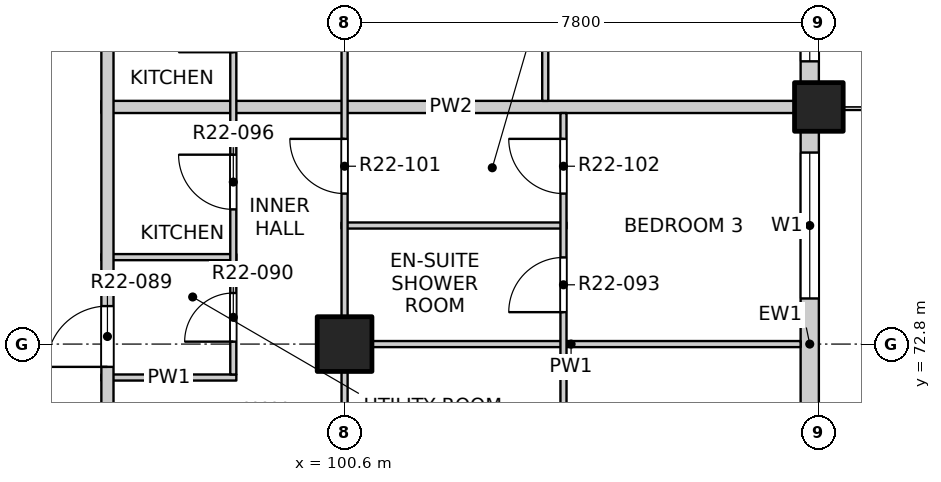
"""IFC4 building model, lengths in metres.
Left out: names, types, materials, properties, quantities, classifications, styles, units other than length and angle.
Written with IfcOpenShell. Run it as: python <this file> out.ifc"""

import sys

from ifc_helpers import new_model, si_unit, direction, frame, frame_2d, origin, origin_2d, place, context, subcontext, project, spatial, rectangle, extrude, element, fill, save


model = new_model("IFC4")
c1 = context("Model", 3, precision=1e-05, world=origin(), true_north=direction((0.0, 1.0)))
c2 = subcontext(c1, "Body", "Model", "MODEL_VIEW")
j1 = project(units=[si_unit("LENGTHUNIT", "METRE"), si_unit("PLANEANGLEUNIT", "RADIAN")], contexts=[c1])
p1 = place(None, origin())
s1 = spatial("IfcSite", under=j1, at=p1, CompositionType="ELEMENT")
p2 = place(p1, origin())
s2 = spatial("IfcBuilding", under=s1, at=p2, CompositionType="ELEMENT")
p3 = place(p2, frame((0.0, 0.0, 231.3)))
s3 = spatial("IfcBuildingStorey", under=s2, at=p3, CompositionType="ELEMENT", Elevation=231.3)
p4 = place(p3, frame((108.4, 76.7, -0.25), z_axis=(0.0, 0.0, 1.0), x_axis=(1.0, 0.0, 0.0)))
e1 = element("IfcColumn", 1, at=p4, inside=s3, PredefinedType="COLUMN", context=c2, shape_type="SweptSolid", body=[
    extrude(rectangle(XDim=0.8, YDim=0.8, at=origin_2d()), origin(), (0.0, 0.0, 1.0), 3.4),
])
p5 = place(p3, frame((100.6, 72.8, -0.25), z_axis=(0.0, 0.0, 1.0), x_axis=(1.0, 0.0, 0.0)))
e2 = element("IfcColumn", 2, at=p5, inside=s3, PredefinedType="COLUMN", context=c2, shape_type="SweptSolid", body=[
    extrude(rectangle(XDim=0.9, YDim=0.9, at=origin_2d()), origin(), (0.0, 0.0, 1.0), 3.4),
])
p6 = place(p3, frame((108.25, 69.3, 0.0), z_axis=(0.0, 0.0, 1.0), x_axis=(0.0, 1.0, 0.0)))
e3 = element("IfcWall", 3, at=p6, inside=s3, PredefinedType="SOLIDWALL", context=c2, shape_type="SweptSolid", body=[
    extrude(rectangle(XDim=7.0, YDim=0.3, at=frame_2d((3.5, 0.0))), origin(), (0.0, 0.0, 1.0), 2.7),
])
p7 = place(p6, frame((0.65, 0.0, 0.0)))
e4 = element("IfcOpeningElement", 4, at=p7, cuts=e3, PredefinedType="OPENING", context=c2, shape_type="SweptSolid", body=[
    extrude(rectangle(XDim=1.8, YDim=2.4, at=frame_2d((0.9, 1.2))), frame((0.0, 0.16, 0.0), z_axis=(0.0, -1.0, 0.0), x_axis=(1.0, 0.0, 0.0)), (0.0, 0.0, 1.0), 0.32),
])
p8 = place(p6, frame((4.25, 0.0, 0.9)))
e5 = element("IfcOpeningElement", 5, at=p8, cuts=e3, PredefinedType="OPENING", context=c2, shape_type="SweptSolid", body=[
    extrude(rectangle(XDim=2.4, YDim=1.8, at=frame_2d((1.2, 0.9))), frame((0.0, 0.16, 0.0), z_axis=(0.0, -1.0, 0.0), x_axis=(1.0, 0.0, 0.0)), (0.0, 0.0, 1.0), 0.32),
])
p9 = place(p3, frame((108.25, 77.1, 0.0), z_axis=(0.0, 0.0, 1.0), x_axis=(0.0, 1.0, 0.0)))
e6 = element("IfcWall", 6, at=p9, inside=s3, PredefinedType="SOLIDWALL", context=c2, shape_type="SweptSolid", body=[
    extrude(rectangle(XDim=7.4, YDim=0.3, at=frame_2d((3.7, 0.0))), origin(), (0.0, 0.0, 1.0), 2.7),
])
p10 = place(p9, frame((0.35, 0.0, 0.9)))
e7 = element("IfcOpeningElement", 7, at=p10, cuts=e6, PredefinedType="OPENING", context=c2, shape_type="SweptSolid", body=[
    extrude(rectangle(XDim=2.4, YDim=1.8, at=frame_2d((1.2, 0.9))), frame((0.0, 0.16, 0.0), z_axis=(0.0, -1.0, 0.0), x_axis=(1.0, 0.0, 0.0)), (0.0, 0.0, 1.0), 0.32),
])
p11 = place(p9, frame((4.25, 0.0, 0.9)))
e8 = element("IfcOpeningElement", 8, at=p11, cuts=e6, PredefinedType="OPENING", context=c2, shape_type="SweptSolid", body=[
    extrude(rectangle(XDim=2.4, YDim=1.8, at=frame_2d((1.2, 0.9))), frame((0.0, 0.16, 0.0), z_axis=(0.0, -1.0, 0.0), x_axis=(1.0, 0.0, 0.0)), (0.0, 0.0, 1.0), 0.32),
])
p12 = place(p3, frame((96.6, 72.25, 0.0), z_axis=(0.0, 0.0, 1.0), x_axis=(1.0, 0.0, 0.0)))
e9 = element("IfcWall", 9, at=p12, inside=s3, PredefinedType="PARTITIONING", context=c2, shape_type="SweptSolid", body=[
    extrude(rectangle(XDim=2.22, YDim=0.1, at=frame_2d((1.11, 0.0))), origin(), (0.0, 0.0, 1.0), 3.15),
])
p13 = place(p3, frame((100.55, 72.8, 0.0), z_axis=(0.0, 0.0, 1.0), x_axis=(1.0, 0.0, 0.0)))
e10 = element("IfcWall", 10, at=p13, inside=s3, PredefinedType="PARTITIONING", context=c2, shape_type="SweptSolid", body=[
    extrude(rectangle(XDim=7.55, YDim=0.1, at=frame_2d((3.775, 0.0))), origin(), (0.0, 0.0, 1.0), 3.15),
])
p14 = place(p3, frame((96.6, 74.23, 0.0), z_axis=(0.0, 0.0, 1.0), x_axis=(1.0, 0.0, 0.0)))
e11 = element("IfcWall", 11, at=p14, inside=s3, PredefinedType="PARTITIONING", context=c2, shape_type="SweptSolid", body=[
    extrude(rectangle(XDim=2.22, YDim=0.1, at=frame_2d((1.11, 0.0))), origin(), (0.0, 0.0, 1.0), 3.15),
])
p15 = place(p3, frame((100.55, 74.75, 0.0), z_axis=(0.0, 0.0, 1.0), x_axis=(1.0, 0.0, 0.0)))
e12 = element("IfcWall", 12, at=p15, inside=s3, PredefinedType="PARTITIONING", context=c2, shape_type="SweptSolid", body=[
    extrude(rectangle(XDim=3.7, YDim=0.1, at=frame_2d((1.85, 0.0))), origin(), (0.0, 0.0, 1.0), 3.15),
])
p16 = place(p3, frame((96.6, 76.7, 0.0), z_axis=(0.0, 0.0, 1.0), x_axis=(1.0, 0.0, 0.0)))
e13 = element("IfcWall", 13, at=p16, inside=s3, PredefinedType="PARTITIONING", context=c2, shape_type="SweptSolid", body=[
    extrude(rectangle(XDim=11.5, YDim=0.2, at=frame_2d((5.75, 0.0))), origin(), (0.0, 0.0, 1.0), 2.55),
])
p17 = place(p3, frame((96.7, 49.5, 0.0), z_axis=(0.0, 0.0, 1.0), x_axis=(0.0, 1.0, 0.0)))
e14 = element("IfcWall", 14, at=p17, inside=s3, PredefinedType="PARTITIONING", context=c2, shape_type="SweptSolid", body=[
    extrude(rectangle(XDim=34.9, YDim=0.2, at=frame_2d((17.45, 0.0))), origin(), (0.0, 0.0, 1.0), 3.15),
])
p18 = place(p17, frame((9.675, 0.0, 0.0)))
e15 = element("IfcOpeningElement", 15, at=p18, cuts=e14, PredefinedType="OPENING", context=c2, shape_type="SweptSolid", body=[
    extrude(rectangle(XDim=1.0, YDim=2.1, at=frame_2d((0.5, 1.05))), frame((0.0, 0.11, 0.0), z_axis=(0.0, -1.0, 0.0), x_axis=(1.0, 0.0, 0.0)), (0.0, 0.0, 1.0), 0.22),
])
p19 = place(p17, frame((22.925, 0.0, 0.0)))
e16 = element("IfcOpeningElement", 16, at=p19, cuts=e14, PredefinedType="OPENING", context=c2, shape_type="SweptSolid", body=[
    extrude(rectangle(XDim=1.0, YDim=2.1, at=frame_2d((0.5, 1.05))), frame((0.0, 0.11, 0.0), z_axis=(0.0, -1.0, 0.0), x_axis=(1.0, 0.0, 0.0)), (0.0, 0.0, 1.0), 0.22),
])
p20 = place(p17, frame((33.025, 0.0, 0.0)))
e17 = element("IfcOpeningElement", 17, at=p20, cuts=e14, PredefinedType="OPENING", context=c2, shape_type="SweptSolid", body=[
    extrude(rectangle(XDim=1.0, YDim=2.1, at=frame_2d((0.5, 1.05))), frame((0.0, 0.11, 0.0), z_axis=(0.0, -1.0, 0.0), x_axis=(1.0, 0.0, 0.0)), (0.0, 0.0, 1.0), 0.22),
])
p21 = place(p3, frame((98.77, 72.3, 0.0), z_axis=(0.0, 0.0, 1.0), x_axis=(0.0, 1.0, 0.0)))
e18 = element("IfcWall", 18, at=p21, inside=s3, PredefinedType="PARTITIONING", context=c2, shape_type="SweptSolid", body=[
    extrude(rectangle(XDim=8.9, YDim=0.1, at=frame_2d((4.45, 0.0))), origin(), (0.0, 0.0, 1.0), 3.15),
])
p22 = place(p21, frame((0.54, 0.0, 0.0)))
e19 = element("IfcOpeningElement", 19, at=p22, cuts=e18, PredefinedType="OPENING", context=c2, shape_type="SweptSolid", body=[
    extrude(rectangle(XDim=0.8, YDim=2.1, at=frame_2d((0.4, 1.05))), frame((0.0, 0.06, 0.0), z_axis=(0.0, -1.0, 0.0), x_axis=(1.0, 0.0, 0.0)), (0.0, 0.0, 1.0), 0.12),
])
p23 = place(p21, frame((2.715, 0.0, 0.0)))
e20 = element("IfcOpeningElement", 20, at=p23, cuts=e18, PredefinedType="OPENING", context=c2, shape_type="SweptSolid", body=[
    extrude(rectangle(XDim=0.9, YDim=2.1, at=frame_2d((0.45, 1.05))), frame((0.0, 0.06, 0.0), z_axis=(0.0, -1.0, 0.0), x_axis=(1.0, 0.0, 0.0)), (0.0, 0.0, 1.0), 0.12),
])
p24 = place(p21, frame((5.3, 0.0, 0.0)))
e21 = element("IfcOpeningElement", 21, at=p24, cuts=e18, PredefinedType="OPENING", context=c2, shape_type="SweptSolid", body=[
    extrude(rectangle(XDim=0.9, YDim=2.1, at=frame_2d((0.45, 1.05))), frame((0.0, 0.06, 0.0), z_axis=(0.0, -1.0, 0.0), x_axis=(1.0, 0.0, 0.0)), (0.0, 0.0, 1.0), 0.12),
])
p25 = place(p21, frame((7.625, 0.0, 0.0)))
e22 = element("IfcOpeningElement", 22, at=p25, cuts=e18, PredefinedType="OPENING", context=c2, shape_type="SweptSolid", body=[
    extrude(rectangle(XDim=0.8, YDim=2.1, at=frame_2d((0.4, 1.05))), frame((0.0, 0.06, 0.0), z_axis=(0.0, -1.0, 0.0), x_axis=(1.0, 0.0, 0.0)), (0.0, 0.0, 1.0), 0.12),
])
p26 = place(p3, frame((100.6, 41.9, 0.0), z_axis=(0.0, 0.0, 1.0), x_axis=(0.0, 1.0, 0.0)))
e23 = element("IfcWall", 23, at=p26, inside=s3, PredefinedType="PARTITIONING", context=c2, shape_type="SweptSolid", body=[
    extrude(rectangle(XDim=46.2, YDim=0.1, at=frame_2d((23.1, 0.0))), origin(), (0.0, 0.0, 1.0), 3.15),
])
p27 = place(p26, frame((1.2, 0.0, 0.0)))
e24 = element("IfcOpeningElement", 24, at=p27, cuts=e23, PredefinedType="OPENING", context=c2, shape_type="SweptSolid", body=[
    extrude(rectangle(XDim=0.9, YDim=2.1, at=frame_2d((0.45, 1.05))), frame((0.0, 0.06, 0.0), z_axis=(0.0, -1.0, 0.0), x_axis=(1.0, 0.0, 0.0)), (0.0, 0.0, 1.0), 0.12),
])
p28 = place(p26, frame((6.025, 0.0, 0.0)))
e25 = element("IfcOpeningElement", 25, at=p28, cuts=e23, PredefinedType="OPENING", context=c2, shape_type="SweptSolid", body=[
    extrude(rectangle(XDim=0.9, YDim=2.1, at=frame_2d((0.45, 1.05))), frame((0.0, 0.06, 0.0), z_axis=(0.0, -1.0, 0.0), x_axis=(1.0, 0.0, 0.0)), (0.0, 0.0, 1.0), 0.12),
])
p29 = place(p26, frame((9.0, 0.0, 0.0)))
e26 = element("IfcOpeningElement", 26, at=p29, cuts=e23, PredefinedType="OPENING", context=c2, shape_type="SweptSolid", body=[
    extrude(rectangle(XDim=0.9, YDim=2.1, at=frame_2d((0.45, 1.05))), frame((0.0, 0.06, 0.0), z_axis=(0.0, -1.0, 0.0), x_axis=(1.0, 0.0, 0.0)), (0.0, 0.0, 1.0), 0.12),
])
p30 = place(p26, frame((12.9, 0.0, 0.0)))
e27 = element("IfcOpeningElement", 27, at=p30, cuts=e23, PredefinedType="OPENING", context=c2, shape_type="SweptSolid", body=[
    extrude(rectangle(XDim=0.9, YDim=2.1, at=frame_2d((0.45, 1.05))), frame((0.0, 0.06, 0.0), z_axis=(0.0, -1.0, 0.0), x_axis=(1.0, 0.0, 0.0)), (0.0, 0.0, 1.0), 0.12),
])
p31 = place(p26, frame((17.775, 0.0, 0.0)))
e28 = element("IfcOpeningElement", 28, at=p31, cuts=e23, PredefinedType="OPENING", context=c2, shape_type="SweptSolid", body=[
    extrude(rectangle(XDim=0.9, YDim=2.1, at=frame_2d((0.45, 1.05))), frame((0.0, 0.06, 0.0), z_axis=(0.0, -1.0, 0.0), x_axis=(1.0, 0.0, 0.0)), (0.0, 0.0, 1.0), 0.12),
])
p32 = place(p26, frame((21.625, 0.0, 0.0)))
e29 = element("IfcOpeningElement", 29, at=p32, cuts=e23, PredefinedType="OPENING", context=c2, shape_type="SweptSolid", body=[
    extrude(rectangle(XDim=0.9, YDim=2.1, at=frame_2d((0.45, 1.05))), frame((0.0, 0.06, 0.0), z_axis=(0.0, -1.0, 0.0), x_axis=(1.0, 0.0, 0.0)), (0.0, 0.0, 1.0), 0.12),
])
p33 = place(p26, frame((25.575, 0.0, 0.0)))
e30 = element("IfcOpeningElement", 30, at=p33, cuts=e23, PredefinedType="OPENING", context=c2, shape_type="SweptSolid", body=[
    extrude(rectangle(XDim=0.9, YDim=2.1, at=frame_2d((0.45, 1.05))), frame((0.0, 0.06, 0.0), z_axis=(0.0, -1.0, 0.0), x_axis=(1.0, 0.0, 0.0)), (0.0, 0.0, 1.0), 0.12),
])
p34 = place(p26, frame((28.5, 0.0, 0.0)))
e31 = element("IfcOpeningElement", 31, at=p34, cuts=e23, PredefinedType="OPENING", context=c2, shape_type="SweptSolid", body=[
    extrude(rectangle(XDim=0.9, YDim=2.1, at=frame_2d((0.45, 1.05))), frame((0.0, 0.06, 0.0), z_axis=(0.0, -1.0, 0.0), x_axis=(1.0, 0.0, 0.0)), (0.0, 0.0, 1.0), 0.12),
])
p35 = place(p26, frame((33.375, 0.0, 0.0)))
e32 = element("IfcOpeningElement", 32, at=p35, cuts=e23, PredefinedType="OPENING", context=c2, shape_type="SweptSolid", body=[
    extrude(rectangle(XDim=0.9, YDim=2.1, at=frame_2d((0.45, 1.05))), frame((0.0, 0.06, 0.0), z_axis=(0.0, -1.0, 0.0), x_axis=(1.0, 0.0, 0.0)), (0.0, 0.0, 1.0), 0.12),
])
p36 = place(p26, frame((36.3, 0.0, 0.0)))
e33 = element("IfcOpeningElement", 33, at=p36, cuts=e23, PredefinedType="OPENING", context=c2, shape_type="SweptSolid", body=[
    extrude(rectangle(XDim=0.9, YDim=2.1, at=frame_2d((0.45, 1.05))), frame((0.0, 0.06, 0.0), z_axis=(0.0, -1.0, 0.0), x_axis=(1.0, 0.0, 0.0)), (0.0, 0.0, 1.0), 0.12),
])
p37 = place(p26, frame((40.2, 0.0, 0.0)))
e34 = element("IfcOpeningElement", 34, at=p37, cuts=e23, PredefinedType="OPENING", context=c2, shape_type="SweptSolid", body=[
    extrude(rectangle(XDim=0.9, YDim=2.1, at=frame_2d((0.45, 1.05))), frame((0.0, 0.06, 0.0), z_axis=(0.0, -1.0, 0.0), x_axis=(1.0, 0.0, 0.0)), (0.0, 0.0, 1.0), 0.12),
])
p38 = place(p26, frame((44.1, 0.0, 0.0)))
e35 = element("IfcOpeningElement", 35, at=p38, cuts=e23, PredefinedType="OPENING", context=c2, shape_type="SweptSolid", body=[
    extrude(rectangle(XDim=0.9, YDim=2.1, at=frame_2d((0.45, 1.05))), frame((0.0, 0.06, 0.0), z_axis=(0.0, -1.0, 0.0), x_axis=(1.0, 0.0, 0.0)), (0.0, 0.0, 1.0), 0.12),
])
p39 = place(p3, frame((103.9, 76.8, 0.0), z_axis=(0.0, 0.0, 1.0), x_axis=(0.0, 1.0, 0.0)))
e36 = element("IfcWall", 36, at=p39, inside=s3, PredefinedType="PARTITIONING", context=c2, shape_type="SweptSolid", body=[
    extrude(rectangle(XDim=11.3, YDim=0.1, at=frame_2d((5.65, 0.0))), origin(), (0.0, 0.0, 1.0), 3.15),
])
p40 = place(p39, frame((1.25, 0.0, 0.0)))
e37 = element("IfcOpeningElement", 37, at=p40, cuts=e36, PredefinedType="OPENING", context=c2, shape_type="SweptSolid", body=[
    extrude(rectangle(XDim=1.2, YDim=2.1, at=frame_2d((0.6, 1.05))), frame((0.0, 0.06, 0.0), z_axis=(0.0, -1.0, 0.0), x_axis=(1.0, 0.0, 0.0)), (0.0, 0.0, 1.0), 0.12),
])
p41 = place(p39, frame((5.15, 0.0, 0.0)))
e38 = element("IfcOpeningElement", 38, at=p41, cuts=e36, PredefinedType="OPENING", context=c2, shape_type="SweptSolid", body=[
    extrude(rectangle(XDim=1.2, YDim=2.1, at=frame_2d((0.6, 1.05))), frame((0.0, 0.06, 0.0), z_axis=(0.0, -1.0, 0.0), x_axis=(1.0, 0.0, 0.0)), (0.0, 0.0, 1.0), 0.12),
])
p42 = place(p39, frame((9.05, 0.0, 0.0)))
e39 = element("IfcOpeningElement", 39, at=p42, cuts=e36, PredefinedType="OPENING", context=c2, shape_type="SweptSolid", body=[
    extrude(rectangle(XDim=1.2, YDim=2.1, at=frame_2d((0.6, 1.05))), frame((0.0, 0.06, 0.0), z_axis=(0.0, -1.0, 0.0), x_axis=(1.0, 0.0, 0.0)), (0.0, 0.0, 1.0), 0.12),
])
p43 = place(p3, frame((104.2, 41.9, 0.0), z_axis=(0.0, 0.0, 1.0), x_axis=(0.0, 1.0, 0.0)))
e40 = element("IfcWall", 40, at=p43, inside=s3, PredefinedType="PARTITIONING", context=c2, shape_type="SweptSolid", body=[
    extrude(rectangle(XDim=34.7, YDim=0.1, at=frame_2d((17.35, 0.0))), origin(), (0.0, 0.0, 1.0), 3.15),
])
p44 = place(p43, frame((1.05, 0.0, 0.0)))
e41 = element("IfcOpeningElement", 41, at=p44, cuts=e40, PredefinedType="OPENING", context=c2, shape_type="SweptSolid", body=[
    extrude(rectangle(XDim=1.2, YDim=2.1, at=frame_2d((0.6, 1.05))), frame((0.0, 0.06, 0.0), z_axis=(0.0, -1.0, 0.0), x_axis=(1.0, 0.0, 0.0)), (0.0, 0.0, 1.0), 0.12),
])
p45 = place(p43, frame((4.125, 0.0, 0.0)))
e42 = element("IfcOpeningElement", 42, at=p45, cuts=e40, PredefinedType="OPENING", context=c2, shape_type="SweptSolid", body=[
    extrude(rectangle(XDim=0.9, YDim=2.1, at=frame_2d((0.45, 1.05))), frame((0.0, 0.06, 0.0), z_axis=(0.0, -1.0, 0.0), x_axis=(1.0, 0.0, 0.0)), (0.0, 0.0, 1.0), 0.12),
])
p46 = place(p43, frame((6.075, 0.0, 0.0)))
e43 = element("IfcOpeningElement", 43, at=p46, cuts=e40, PredefinedType="OPENING", context=c2, shape_type="SweptSolid", body=[
    extrude(rectangle(XDim=0.9, YDim=2.1, at=frame_2d((0.45, 1.05))), frame((0.0, 0.06, 0.0), z_axis=(0.0, -1.0, 0.0), x_axis=(1.0, 0.0, 0.0)), (0.0, 0.0, 1.0), 0.12),
])
p47 = place(p43, frame((8.85, 0.0, 0.0)))
e44 = element("IfcOpeningElement", 44, at=p47, cuts=e40, PredefinedType="OPENING", context=c2, shape_type="SweptSolid", body=[
    extrude(rectangle(XDim=1.2, YDim=2.1, at=frame_2d((0.6, 1.05))), frame((0.0, 0.06, 0.0), z_axis=(0.0, -1.0, 0.0), x_axis=(1.0, 0.0, 0.0)), (0.0, 0.0, 1.0), 0.12),
])
p48 = place(p43, frame((12.75, 0.0, 0.0)))
e45 = element("IfcOpeningElement", 45, at=p48, cuts=e40, PredefinedType="OPENING", context=c2, shape_type="SweptSolid", body=[
    extrude(rectangle(XDim=1.2, YDim=2.1, at=frame_2d((0.6, 1.05))), frame((0.0, 0.06, 0.0), z_axis=(0.0, -1.0, 0.0), x_axis=(1.0, 0.0, 0.0)), (0.0, 0.0, 1.0), 0.12),
])
p49 = place(p43, frame((15.825, 0.0, 0.0)))
e46 = element("IfcOpeningElement", 46, at=p49, cuts=e40, PredefinedType="OPENING", context=c2, shape_type="SweptSolid", body=[
    extrude(rectangle(XDim=0.9, YDim=2.1, at=frame_2d((0.45, 1.05))), frame((0.0, 0.06, 0.0), z_axis=(0.0, -1.0, 0.0), x_axis=(1.0, 0.0, 0.0)), (0.0, 0.0, 1.0), 0.12),
])
p50 = place(p43, frame((17.775, 0.0, 0.0)))
e47 = element("IfcOpeningElement", 47, at=p50, cuts=e40, PredefinedType="OPENING", context=c2, shape_type="SweptSolid", body=[
    extrude(rectangle(XDim=0.9, YDim=2.1, at=frame_2d((0.45, 1.05))), frame((0.0, 0.06, 0.0), z_axis=(0.0, -1.0, 0.0), x_axis=(1.0, 0.0, 0.0)), (0.0, 0.0, 1.0), 0.12),
])
p51 = place(p43, frame((19.725, 0.0, 0.0)))
e48 = element("IfcOpeningElement", 48, at=p51, cuts=e40, PredefinedType="OPENING", context=c2, shape_type="SweptSolid", body=[
    extrude(rectangle(XDim=0.9, YDim=2.1, at=frame_2d((0.45, 1.05))), frame((0.0, 0.06, 0.0), z_axis=(0.0, -1.0, 0.0), x_axis=(1.0, 0.0, 0.0)), (0.0, 0.0, 1.0), 0.12),
])
p52 = place(p43, frame((21.675, 0.0, 0.0)))
e49 = element("IfcOpeningElement", 49, at=p52, cuts=e40, PredefinedType="OPENING", context=c2, shape_type="SweptSolid", body=[
    extrude(rectangle(XDim=0.9, YDim=2.1, at=frame_2d((0.45, 1.05))), frame((0.0, 0.06, 0.0), z_axis=(0.0, -1.0, 0.0), x_axis=(1.0, 0.0, 0.0)), (0.0, 0.0, 1.0), 0.12),
])
p53 = place(p43, frame((23.625, 0.0, 0.0)))
e50 = element("IfcOpeningElement", 50, at=p53, cuts=e40, PredefinedType="OPENING", context=c2, shape_type="SweptSolid", body=[
    extrude(rectangle(XDim=0.9, YDim=2.1, at=frame_2d((0.45, 1.05))), frame((0.0, 0.06, 0.0), z_axis=(0.0, -1.0, 0.0), x_axis=(1.0, 0.0, 0.0)), (0.0, 0.0, 1.0), 0.12),
])
p54 = place(p43, frame((25.575, 0.0, 0.0)))
e51 = element("IfcOpeningElement", 51, at=p54, cuts=e40, PredefinedType="OPENING", context=c2, shape_type="SweptSolid", body=[
    extrude(rectangle(XDim=0.9, YDim=2.1, at=frame_2d((0.45, 1.05))), frame((0.0, 0.06, 0.0), z_axis=(0.0, -1.0, 0.0), x_axis=(1.0, 0.0, 0.0)), (0.0, 0.0, 1.0), 0.12),
])
p55 = place(p43, frame((28.35, 0.0, 0.0)))
e52 = element("IfcOpeningElement", 52, at=p55, cuts=e40, PredefinedType="OPENING", context=c2, shape_type="SweptSolid", body=[
    extrude(rectangle(XDim=1.2, YDim=2.1, at=frame_2d((0.6, 1.05))), frame((0.0, 0.06, 0.0), z_axis=(0.0, -1.0, 0.0), x_axis=(1.0, 0.0, 0.0)), (0.0, 0.0, 1.0), 0.12),
])
p56 = place(p43, frame((31.425, 0.0, 0.0)))
e53 = element("IfcOpeningElement", 53, at=p56, cuts=e40, PredefinedType="OPENING", context=c2, shape_type="SweptSolid", body=[
    extrude(rectangle(XDim=0.9, YDim=2.1, at=frame_2d((0.45, 1.05))), frame((0.0, 0.06, 0.0), z_axis=(0.0, -1.0, 0.0), x_axis=(1.0, 0.0, 0.0)), (0.0, 0.0, 1.0), 0.12),
])
p57 = place(p43, frame((33.375, 0.0, 0.0)))
e54 = element("IfcOpeningElement", 54, at=p57, cuts=e40, PredefinedType="OPENING", context=c2, shape_type="SweptSolid", body=[
    extrude(rectangle(XDim=0.9, YDim=2.1, at=frame_2d((0.45, 1.05))), frame((0.0, 0.06, 0.0), z_axis=(0.0, -1.0, 0.0), x_axis=(1.0, 0.0, 0.0)), (0.0, 0.0, 1.0), 0.12),
])
p58 = place(p8, origin())
e55 = element("IfcWindow", 55, at=p58, inside=s3, PartitioningType="DOUBLE_PANEL_VERTICAL", PredefinedType="WINDOW", context=c2, shape_type="SweptSolid", body=[
    extrude(rectangle(XDim=2.4, YDim=1.8, at=frame_2d((1.2, 0.9))), frame((0.0, 0.03, 0.0), z_axis=(0.0, -1.0, 0.0), x_axis=(1.0, 0.0, 0.0)), (0.0, 0.0, 1.0), 0.06),
])
fill(e5, e55)
p59 = place(p10, origin())
e56 = element("IfcWindow", 56, at=p59, inside=s3, PartitioningType="DOUBLE_PANEL_VERTICAL", PredefinedType="WINDOW", context=c2, shape_type="SweptSolid", body=[
    extrude(rectangle(XDim=2.4, YDim=1.8, at=frame_2d((1.2, 0.9))), frame((0.0, 0.03, 0.0), z_axis=(0.0, -1.0, 0.0), x_axis=(1.0, 0.0, 0.0)), (0.0, 0.0, 1.0), 0.06),
])
fill(e7, e56)
p60 = place(p19, origin())
e57 = element("IfcDoor", 57, at=p60, inside=s3, OperationType="SINGLE_SWING_LEFT", PredefinedType="DOOR", context=c2, shape_type="SweptSolid", body=[
    extrude(rectangle(XDim=1.0, YDim=2.1, at=frame_2d((0.5, 1.05))), frame((0.0, 0.025, 0.0), z_axis=(0.0, -1.0, 0.0), x_axis=(1.0, 0.0, 0.0)), (0.0, 0.0, 1.0), 0.05),
])
fill(e16, e57)
p61 = place(p22, origin())
e58 = element("IfcDoor", 58, at=p61, inside=s3, OperationType="SINGLE_SWING_LEFT", PredefinedType="DOOR", context=c2, shape_type="SweptSolid", body=[
    extrude(rectangle(XDim=0.8, YDim=2.1, at=frame_2d((0.4, 1.05))), frame((0.0, 0.025, 0.0), z_axis=(0.0, -1.0, 0.0), x_axis=(1.0, 0.0, 0.0)), (0.0, 0.0, 1.0), 0.05),
])
fill(e19, e58)
p62 = place(p56, origin())
e59 = element("IfcDoor", 59, at=p62, inside=s3, OperationType="SINGLE_SWING_LEFT", PredefinedType="DOOR", context=c2, shape_type="SweptSolid", body=[
    extrude(rectangle(XDim=0.9, YDim=2.1, at=frame_2d((0.45, 1.05))), frame((0.0, 0.025, 0.0), z_axis=(0.0, -1.0, 0.0), x_axis=(1.0, 0.0, 0.0)), (0.0, 0.0, 1.0), 0.05),
])
fill(e53, e59)
p63 = place(p23, origin())
e60 = element("IfcDoor", 60, at=p63, inside=s3, OperationType="SINGLE_SWING_RIGHT", PredefinedType="DOOR", context=c2, shape_type="SweptSolid", body=[
    extrude(rectangle(XDim=0.9, YDim=2.1, at=frame_2d((0.45, 1.05))), frame((0.0, 0.025, 0.0), z_axis=(0.0, -1.0, 0.0), x_axis=(1.0, 0.0, 0.0)), (0.0, 0.0, 1.0), 0.05),
])
fill(e20, e60)
p64 = place(p35, origin())
e61 = element("IfcDoor", 61, at=p64, inside=s3, OperationType="SINGLE_SWING_RIGHT", PredefinedType="DOOR", context=c2, shape_type="SweptSolid", body=[
    extrude(rectangle(XDim=0.9, YDim=2.1, at=frame_2d((0.45, 1.05))), frame((0.0, 0.025, 0.0), z_axis=(0.0, -1.0, 0.0), x_axis=(1.0, 0.0, 0.0)), (0.0, 0.0, 1.0), 0.05),
])
fill(e32, e61)
p65 = place(p57, origin())
e62 = element("IfcDoor", 62, at=p65, inside=s3, OperationType="SINGLE_SWING_RIGHT", PredefinedType="DOOR", context=c2, shape_type="SweptSolid", body=[
    extrude(rectangle(XDim=0.9, YDim=2.1, at=frame_2d((0.45, 1.05))), frame((0.0, 0.025, 0.0), z_axis=(0.0, -1.0, 0.0), x_axis=(1.0, 0.0, 0.0)), (0.0, 0.0, 1.0), 0.05),
])
fill(e54, e62)
save(model, sys.argv[1])
